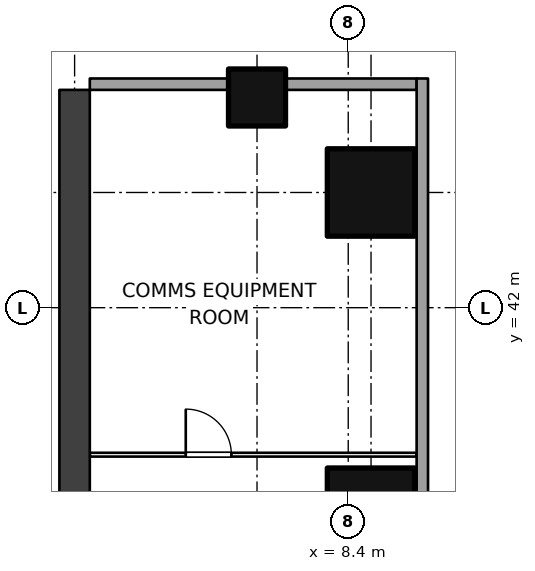
"""IFC4 building model, lengths in metres.
Left out: names, types, materials, properties, quantities, classifications, styles, units other than length and angle.
Written with IfcOpenShell. Run it as: python <this file> out.ifc"""

import sys

from ifc_helpers import new_model, si_unit, direction, frame, frame_2d, origin, origin_2d, place, context, subcontext, project, spatial, rectangle, extrude, element, fill, save


model = new_model("IFC4")
c1 = context("Model", 3, precision=1e-05, world=origin(), true_north=direction((0.0, 1.0)))
c2 = subcontext(c1, "Body", "Model", "MODEL_VIEW")
j1 = project(units=[si_unit("LENGTHUNIT", "METRE"), si_unit("PLANEANGLEUNIT", "RADIAN")], contexts=[c1])
p1 = place(None, origin())
s1 = spatial("IfcSite", under=j1, at=p1, CompositionType="ELEMENT")
p2 = place(p1, origin())
s2 = spatial("IfcBuilding", under=s1, at=p2, CompositionType="ELEMENT")
p3 = place(p2, frame((0.0, 0.0, -3.5)))
s3 = spatial("IfcBuildingStorey", under=s2, at=p3, CompositionType="ELEMENT", Elevation=-3.5)
for number, where, z_axis, x_axis in (
    (1, (9.0, 36.632, 0.0), (0.0, 0.0, 1.0), (1.0, 0.0, 0.0)),
    (2, (9.0, 45.031, 0.0), (0.0, 0.0, 1.0), (1.0, 0.0, 0.0)),
):
    element("IfcColumn", number, at=place(p3, frame(where, z_axis=z_axis, x_axis=x_axis)), inside=s3, PredefinedType="COLUMN", context=c2, shape_type="SweptSolid", body=[
        extrude(rectangle(XDim=2.3, YDim=2.3, at=origin_2d()), origin(), (0.0, 0.0, 1.0), 3.5),
    ])
p4 = place(p3, frame((6.0, 47.531, 0.0), z_axis=(0.0, 0.0, 1.0), x_axis=(1.0, 0.0, 0.0)))
e3 = element("IfcColumn", 3, at=p4, inside=s3, PredefinedType="COLUMN", context=c2, shape_type="SweptSolid", body=[
    extrude(rectangle(XDim=1.5, YDim=1.5, at=origin_2d()), origin(), (0.0, 0.0, 1.0), 3.5),
])
p5 = place(p3, frame((1.2, 10.981, 0.0), z_axis=(0.0, 0.0, 1.0), x_axis=(0.0, 1.0, 0.0)))
e4 = element("IfcWall", 4, at=p5, inside=s3, PredefinedType="SHEAR", context=c2, shape_type="SweptSolid", body=[
    extrude(rectangle(XDim=36.75, YDim=0.8, at=frame_2d((18.375, 0.0))), origin(), (0.0, 0.0, 1.0), 3.5),
])
p6 = place(p5, frame((1.35, 0.0, 0.0)))
e5 = element("IfcOpeningElement", 5, at=p6, cuts=e4, PredefinedType="OPENING", context=c2, shape_type="SweptSolid", body=[
    extrude(rectangle(XDim=1.2, YDim=2.1, at=frame_2d((0.6, 1.05))), frame((0.0, 0.41, 0.0), z_axis=(0.0, -1.0, 0.0), x_axis=(1.0, 0.0, 0.0)), (0.0, 0.0, 1.0), 0.82),
])
p7 = place(p3, frame((1.6, 38.132, 0.0), z_axis=(0.0, 0.0, 1.0), x_axis=(1.0, 0.0, 0.0)))
e6 = element("IfcWall", 6, at=p7, inside=s3, PredefinedType="PARTITIONING", context=c2, shape_type="SweptSolid", body=[
    extrude(rectangle(XDim=8.6, YDim=0.1, at=frame_2d((4.3, 0.0))), origin(), (0.0, 0.0, 1.0), 3.15),
])
p8 = place(p7, frame((2.525, 0.0, 0.0)))
e7 = element("IfcOpeningElement", 7, at=p8, cuts=e6, PredefinedType="OPENING", context=c2, shape_type="SweptSolid", body=[
    extrude(rectangle(XDim=1.2, YDim=2.1, at=frame_2d((0.6, 1.05))), frame((0.0, 0.06, 0.0), z_axis=(0.0, -1.0, 0.0), x_axis=(1.0, 0.0, 0.0)), (0.0, 0.0, 1.0), 0.12),
])
p9 = place(p3, frame((1.6, 47.882, 0.0), z_axis=(0.0, 0.0, 1.0), x_axis=(1.0, 0.0, 0.0)))
e8 = element("IfcWall", 8, at=p9, inside=s3, PredefinedType="SOLIDWALL", context=c2, shape_type="SweptSolid", body=[
    extrude(rectangle(XDim=8.6, YDim=0.3, at=frame_2d((4.3, 0.0))), origin(), (0.0, 0.0, 1.0), 1.55),
])
p10 = place(p3, frame((10.35, 6.149, 0.0), z_axis=(0.0, 0.0, 1.0), x_axis=(0.0, 1.0, 0.0)))
e9 = element("IfcWall", 9, at=p10, inside=s3, PredefinedType="SOLIDWALL", context=c2, shape_type="SweptSolid", body=[
    extrude(rectangle(XDim=41.883, YDim=0.3, at=frame_2d((20.941, 0.0))), origin(), (0.0, 0.0, 1.0), 3.15),
])
p11 = place(p10, frame((25.383, 0.0, 0.0)))
e10 = element("IfcOpeningElement", 10, at=p11, cuts=e9, PredefinedType="OPENING", context=c2, shape_type="SweptSolid", body=[
    extrude(rectangle(XDim=1.8, YDim=2.4, at=frame_2d((0.9, 1.2))), frame((0.0, 0.16, 0.0), z_axis=(0.0, -1.0, 0.0), x_axis=(1.0, 0.0, 0.0)), (0.0, 0.0, 1.0), 0.32),
])
p12 = place(p8, origin())
e11 = element("IfcDoor", 11, at=p12, inside=s3, OperationType="DOUBLE_SWING_LEFT", PredefinedType="DOOR", context=c2, shape_type="SweptSolid", body=[
    extrude(rectangle(XDim=1.2, YDim=2.1, at=frame_2d((0.6, 1.05))), frame((0.0, 0.025, 0.0), z_axis=(0.0, -1.0, 0.0), x_axis=(1.0, 0.0, 0.0)), (0.0, 0.0, 1.0), 0.05),
])
fill(e7, e11)
save(model, sys.argv[1])
